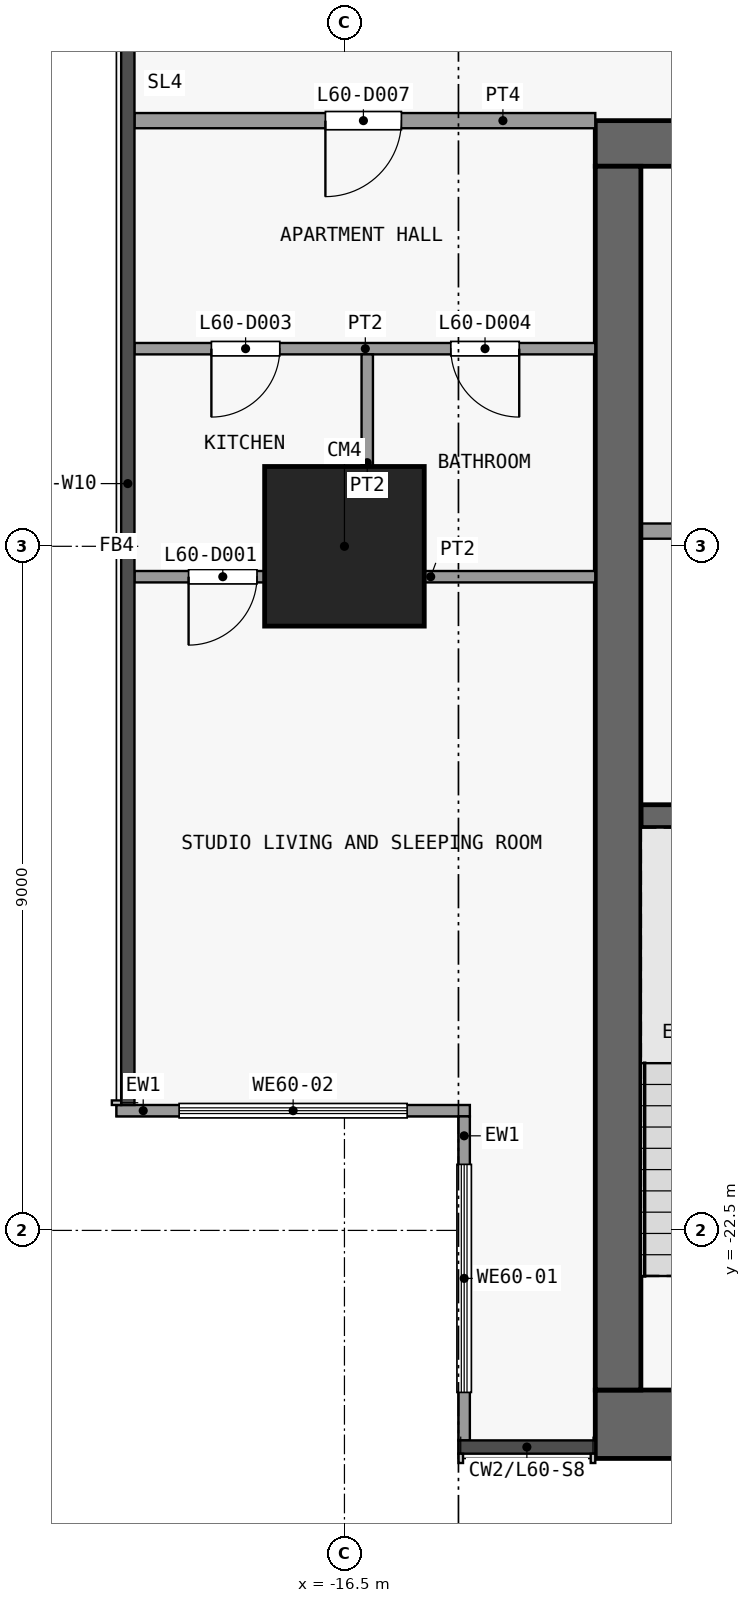
"""IFC4 building model, lengths in metres.
Left out: names, types, materials, properties, quantities, classifications, styles, units other than length and angle.
Written with IfcOpenShell. Run it as: python <this file> out.ifc"""

import sys

from ifc_helpers import new_model, si_unit, direction, frame, frame_2d, origin, origin_2d, place, context, subcontext, project, spatial, rectangle, extrude, element, fill, save


model = new_model("IFC4")
c1 = context("Model", 3, precision=1e-05, world=origin(), true_north=direction((0.0, 1.0)))
c2 = subcontext(c1, "Body", "Model", "MODEL_VIEW")
j1 = project(units=[si_unit("LENGTHUNIT", "METRE"), si_unit("PLANEANGLEUNIT", "RADIAN")], contexts=[c1])
p1 = place(None, origin())
s1 = spatial("IfcSite", under=j1, at=p1, CompositionType="ELEMENT")
p2 = place(p1, origin())
s2 = spatial("IfcBuilding", under=s1, at=p2, CompositionType="ELEMENT")
p3 = place(p2, frame((0.0, 0.0, 237.5)))
s3 = spatial("IfcBuildingStorey", under=s2, at=p3, CompositionType="ELEMENT", Elevation=237.5)
p4 = place(p3, frame((-16.5, -13.5, 0.0), z_axis=(0.0, 0.0, 1.0), x_axis=(1.0, 0.0, 0.0)))
e1 = element("IfcColumn", 1, at=p4, inside=s3, PredefinedType="COLUMN", context=c2, shape_type="SweptSolid", body=[
    extrude(rectangle(XDim=2.1, YDim=2.1, at=origin_2d()), origin(), (0.0, 0.0, 1.0), 3.6),
])
p5 = place(p3, frame((-13.2, -25.05, 0.0), z_axis=(0.0, 0.0, 1.0), x_axis=(1.0, 0.0, 0.0)))
e2 = element("IfcWall", 2, at=p5, inside=s3, PredefinedType="SHEAR", context=c2, shape_type="SweptSolid", body=[
    extrude(rectangle(XDim=26.4, YDim=0.9, at=frame_2d((13.2, 0.0))), origin(), (0.0, 0.0, 1.0), 3.3),
])
p6 = place(p3, frame((-13.2, -8.2, 0.0), z_axis=(0.0, 0.0, 1.0), x_axis=(1.0, 0.0, 0.0)))
e3 = element("IfcWall", 3, at=p6, inside=s3, PredefinedType="SHEAR", context=c2, shape_type="SweptSolid", body=[
    extrude(rectangle(XDim=26.4, YDim=0.6, at=frame_2d((13.2, 0.0))), origin(), (0.0, 0.0, 1.0), 3.3),
])
p7 = place(p6, frame((7.5, 0.0, 0.0)))
e4 = element("IfcOpeningElement", 4, at=p7, cuts=e3, PredefinedType="OPENING", context=c2, shape_type="SweptSolid", body=[
    extrude(rectangle(XDim=1.8, YDim=2.1, at=frame_2d((0.9, 1.05))), frame((0.0, 0.31, 0.0), z_axis=(0.0, -1.0, 0.0), x_axis=(1.0, 0.0, 0.0)), (0.0, 0.0, 1.0), 0.62),
])
p8 = place(p6, frame((17.1, 0.0, 0.0)))
e5 = element("IfcOpeningElement", 5, at=p8, cuts=e3, PredefinedType="OPENING", context=c2, shape_type="SweptSolid", body=[
    extrude(rectangle(XDim=1.8, YDim=2.1, at=frame_2d((0.9, 1.05))), frame((0.0, 0.31, 0.0), z_axis=(0.0, -1.0, 0.0), x_axis=(1.0, 0.0, 0.0)), (0.0, 0.0, 1.0), 0.62),
])
p9 = place(p6, frame((2.425, 0.0, 0.0)))
e6 = element("IfcOpeningElement", 6, at=p9, cuts=e3, PredefinedType="OPENING", context=c2, shape_type="SweptSolid", body=[
    extrude(rectangle(XDim=0.9, YDim=2.1, at=frame_2d((0.45, 1.05))), frame((0.0, 0.31, 0.0), z_axis=(0.0, -1.0, 0.0), x_axis=(1.0, 0.0, 0.0)), (0.0, 0.0, 1.0), 0.62),
])
p10 = place(p6, frame((23.075, 0.0, 0.0)))
e7 = element("IfcOpeningElement", 7, at=p10, cuts=e3, PredefinedType="OPENING", context=c2, shape_type="SweptSolid", body=[
    extrude(rectangle(XDim=0.9, YDim=2.1, at=frame_2d((0.45, 1.05))), frame((0.0, 0.31, 0.0), z_axis=(0.0, -1.0, 0.0), x_axis=(1.0, 0.0, 0.0)), (0.0, 0.0, 1.0), 0.62),
])
p11 = place(p3, frame((-12.9, -24.6, 0.0), z_axis=(0.0, 0.0, 1.0), x_axis=(0.0, 1.0, 0.0)))
e8 = element("IfcWall", 8, at=p11, inside=s3, PredefinedType="SHEAR", context=c2, shape_type="SweptSolid", body=[
    extrude(rectangle(XDim=16.1, YDim=0.6, at=frame_2d((8.05, 0.0))), origin(), (0.0, 0.0, 1.0), 3.3),
])
p12 = place(p3, frame((-12.6, -17.05, 0.0), z_axis=(0.0, 0.0, 1.0), x_axis=(1.0, 0.0, 0.0)))
e9 = element("IfcWall", 9, at=p12, inside=s3, PredefinedType="SHEAR", context=c2, shape_type="SweptSolid", body=[
    extrude(rectangle(XDim=3.1, YDim=0.3, at=frame_2d((1.55, 0.0))), origin(), (0.0, 0.0, 1.0), 3.3),
])
p13 = place(p3, frame((-12.6, -13.3, 0.0), z_axis=(0.0, 0.0, 1.0), x_axis=(1.0, 0.0, 0.0)))
e10 = element("IfcWall", 10, at=p13, inside=s3, PredefinedType="PARTITIONING", context=c2, shape_type="SweptSolid", body=[
    extrude(rectangle(XDim=1.45, YDim=0.2, at=frame_2d((0.725, 0.0))), origin(), (0.0, 0.0, 1.0), 3.3),
])
p14 = place(p3, frame((-14.925, -25.262, 0.0), z_axis=(0.0, 0.0, 1.0), x_axis=(0.0, 1.0, 0.0)))
e11 = element("IfcWall", 11, at=p14, inside=s3, PredefinedType="SOLIDWALL", context=c2, shape_type="SweptSolid", body=[
    extrude(rectangle(XDim=4.262, YDim=0.15, at=frame_2d((2.131, 0.0))), origin(), (0.0, 0.0, 1.0), 3.3),
])
p15 = place(p14, frame((0.631, 0.0, 0.9)))
e12 = element("IfcOpeningElement", 12, at=p15, cuts=e11, PredefinedType="OPENING", context=c2, shape_type="SweptSolid", body=[
    extrude(rectangle(XDim=3.0, YDim=2.4, at=frame_2d((1.5, 1.2))), frame((0.0, 0.085, 0.0), z_axis=(0.0, -1.0, 0.0), x_axis=(1.0, 0.0, 0.0)), (0.0, 0.0, 1.0), 0.17),
])
p16 = place(p3, frame((-14.85, -20.925, 0.0), z_axis=(0.0, 0.0, 1.0), x_axis=(-1.0, 0.0, 0.0)))
e13 = element("IfcWall", 13, at=p16, inside=s3, PredefinedType="SOLIDWALL", context=c2, shape_type="SweptSolid", body=[
    extrude(rectangle(XDim=4.65, YDim=0.15, at=frame_2d((2.325, 0.0))), origin(), (0.0, 0.0, 1.0), 3.3),
])
p17 = place(p16, frame((0.825, 0.0, 0.9)))
e14 = element("IfcOpeningElement", 14, at=p17, cuts=e13, PredefinedType="OPENING", context=c2, shape_type="SweptSolid", body=[
    extrude(rectangle(XDim=3.0, YDim=2.4, at=frame_2d((1.5, 1.2))), frame((0.0, 0.085, 0.0), z_axis=(0.0, -1.0, 0.0), x_axis=(1.0, 0.0, 0.0)), (0.0, 0.0, 1.0), 0.17),
])
p18 = place(p3, frame((-19.262, -13.9, 0.0), z_axis=(0.0, 0.0, 1.0), x_axis=(1.0, 0.0, 0.0)))
e15 = element("IfcWall", 15, at=p18, inside=s3, PredefinedType="PARTITIONING", context=c2, shape_type="SweptSolid", body=[
    extrude(rectangle(XDim=6.062, YDim=0.15, at=frame_2d((3.031, 0.0))), origin(), (0.0, 0.0, 1.0), 3.3),
])
p19 = place(p18, frame((0.712, 0.0, 0.0)))
e16 = element("IfcOpeningElement", 16, at=p19, cuts=e15, PredefinedType="OPENING", context=c2, shape_type="SweptSolid", body=[
    extrude(rectangle(XDim=0.9, YDim=2.1, at=frame_2d((0.45, 1.05))), frame((0.0, 0.085, 0.0), z_axis=(0.0, -1.0, 0.0), x_axis=(1.0, 0.0, 0.0)), (0.0, 0.0, 1.0), 0.17),
])
p20 = place(p3, frame((-19.262, -10.9, 0.0), z_axis=(0.0, 0.0, 1.0), x_axis=(1.0, 0.0, 0.0)))
e17 = element("IfcWall", 17, at=p20, inside=s3, PredefinedType="PARTITIONING", context=c2, shape_type="SweptSolid", body=[
    extrude(rectangle(XDim=6.062, YDim=0.15, at=frame_2d((3.031, 0.0))), origin(), (0.0, 0.0, 1.0), 3.3),
])
p21 = place(p20, frame((1.012, 0.0, 0.0)))
e18 = element("IfcOpeningElement", 18, at=p21, cuts=e17, PredefinedType="OPENING", context=c2, shape_type="SweptSolid", body=[
    extrude(rectangle(XDim=0.9, YDim=2.1, at=frame_2d((0.45, 1.05))), frame((0.0, 0.085, 0.0), z_axis=(0.0, -1.0, 0.0), x_axis=(1.0, 0.0, 0.0)), (0.0, 0.0, 1.0), 0.17),
])
p22 = place(p20, frame((4.162, 0.0, 0.0)))
e19 = element("IfcOpeningElement", 19, at=p22, cuts=e17, PredefinedType="OPENING", context=c2, shape_type="SweptSolid", body=[
    extrude(rectangle(XDim=0.9, YDim=2.1, at=frame_2d((0.45, 1.05))), frame((0.0, 0.085, 0.0), z_axis=(0.0, -1.0, 0.0), x_axis=(1.0, 0.0, 0.0)), (0.0, 0.0, 1.0), 0.17),
])
p23 = place(p3, frame((-19.262, -7.9, 0.0), z_axis=(0.0, 0.0, 1.0), x_axis=(1.0, 0.0, 0.0)))
e20 = element("IfcWall", 20, at=p23, inside=s3, PredefinedType="PARTITIONING", context=c2, shape_type="SweptSolid", body=[
    extrude(rectangle(XDim=6.062, YDim=0.2, at=frame_2d((3.031, 0.0))), origin(), (0.0, 0.0, 1.0), 3.3),
])
p24 = place(p23, frame((2.512, 0.0, 0.0)))
e21 = element("IfcOpeningElement", 21, at=p24, cuts=e20, PredefinedType="OPENING", context=c2, shape_type="SweptSolid", body=[
    extrude(rectangle(XDim=1.0, YDim=2.1, at=frame_2d((0.5, 1.05))), frame((0.0, 0.11, 0.0), z_axis=(0.0, -1.0, 0.0), x_axis=(1.0, 0.0, 0.0)), (0.0, 0.0, 1.0), 0.22),
])
p25 = place(p3, frame((-16.2, -13.825, 0.0), z_axis=(0.0, 0.0, 1.0), x_axis=(0.0, 1.0, 0.0)))
e22 = element("IfcWall", 22, at=p25, inside=s3, PredefinedType="PARTITIONING", context=c2, shape_type="SweptSolid", body=[
    extrude(rectangle(XDim=2.85, YDim=0.15, at=frame_2d((1.425, 0.0))), origin(), (0.0, 0.0, 1.0), 3.3),
])
p26 = place(p15, origin())
e23 = element("IfcWindow", 23, at=p26, inside=s3, PartitioningType="SINGLE_PANEL", PredefinedType="WINDOW", context=c2, shape_type="SweptSolid", body=[
    extrude(rectangle(XDim=3.0, YDim=2.4, at=frame_2d((1.5, 1.2))), frame((0.0, 0.03, 0.0), z_axis=(0.0, -1.0, 0.0), x_axis=(1.0, 0.0, 0.0)), (0.0, 0.0, 1.0), 0.06),
])
fill(e12, e23)
p27 = place(p17, origin())
e24 = element("IfcWindow", 24, at=p27, inside=s3, PartitioningType="SINGLE_PANEL", PredefinedType="WINDOW", context=c2, shape_type="SweptSolid", body=[
    extrude(rectangle(XDim=3.0, YDim=2.4, at=frame_2d((1.5, 1.2))), frame((0.0, 0.03, 0.0), z_axis=(0.0, -1.0, 0.0), x_axis=(1.0, 0.0, 0.0)), (0.0, 0.0, 1.0), 0.06),
])
fill(e14, e24)
p28 = place(p19, origin())
e25 = element("IfcDoor", 25, at=p28, inside=s3, OperationType="SINGLE_SWING_LEFT", PredefinedType="DOOR", context=c2, shape_type="SweptSolid", body=[
    extrude(rectangle(XDim=0.9, YDim=2.1, at=frame_2d((0.45, 1.05))), frame((0.0, 0.025, 0.0), z_axis=(0.0, -1.0, 0.0), x_axis=(1.0, 0.0, 0.0)), (0.0, 0.0, 1.0), 0.05),
])
fill(e16, e25)
p29 = place(p21, origin())
e26 = element("IfcDoor", 26, at=p29, inside=s3, OperationType="SINGLE_SWING_LEFT", PredefinedType="DOOR", context=c2, shape_type="SweptSolid", body=[
    extrude(rectangle(XDim=0.9, YDim=2.1, at=frame_2d((0.45, 1.05))), frame((0.0, 0.025, 0.0), z_axis=(0.0, -1.0, 0.0), x_axis=(1.0, 0.0, 0.0)), (0.0, 0.0, 1.0), 0.05),
])
fill(e18, e26)
p30 = place(p22, origin())
e27 = element("IfcDoor", 27, at=p30, inside=s3, OperationType="SINGLE_SWING_RIGHT", PredefinedType="DOOR", context=c2, shape_type="SweptSolid", body=[
    extrude(rectangle(XDim=0.9, YDim=2.1, at=frame_2d((0.45, 1.05))), frame((0.0, 0.025, 0.0), z_axis=(0.0, -1.0, 0.0), x_axis=(1.0, 0.0, 0.0)), (0.0, 0.0, 1.0), 0.05),
])
fill(e19, e27)
p31 = place(p24, origin())
e28 = element("IfcDoor", 28, at=p31, inside=s3, OperationType="SINGLE_SWING_LEFT", PredefinedType="DOOR", context=c2, shape_type="SweptSolid", body=[
    extrude(rectangle(XDim=1.0, YDim=2.1, at=frame_2d((0.5, 1.05))), frame((0.0, 0.025, 0.0), z_axis=(0.0, -1.0, 0.0), x_axis=(1.0, 0.0, 0.0)), (0.0, 0.0, 1.0), 0.05),
])
fill(e21, e28)
save(model, sys.argv[1])
